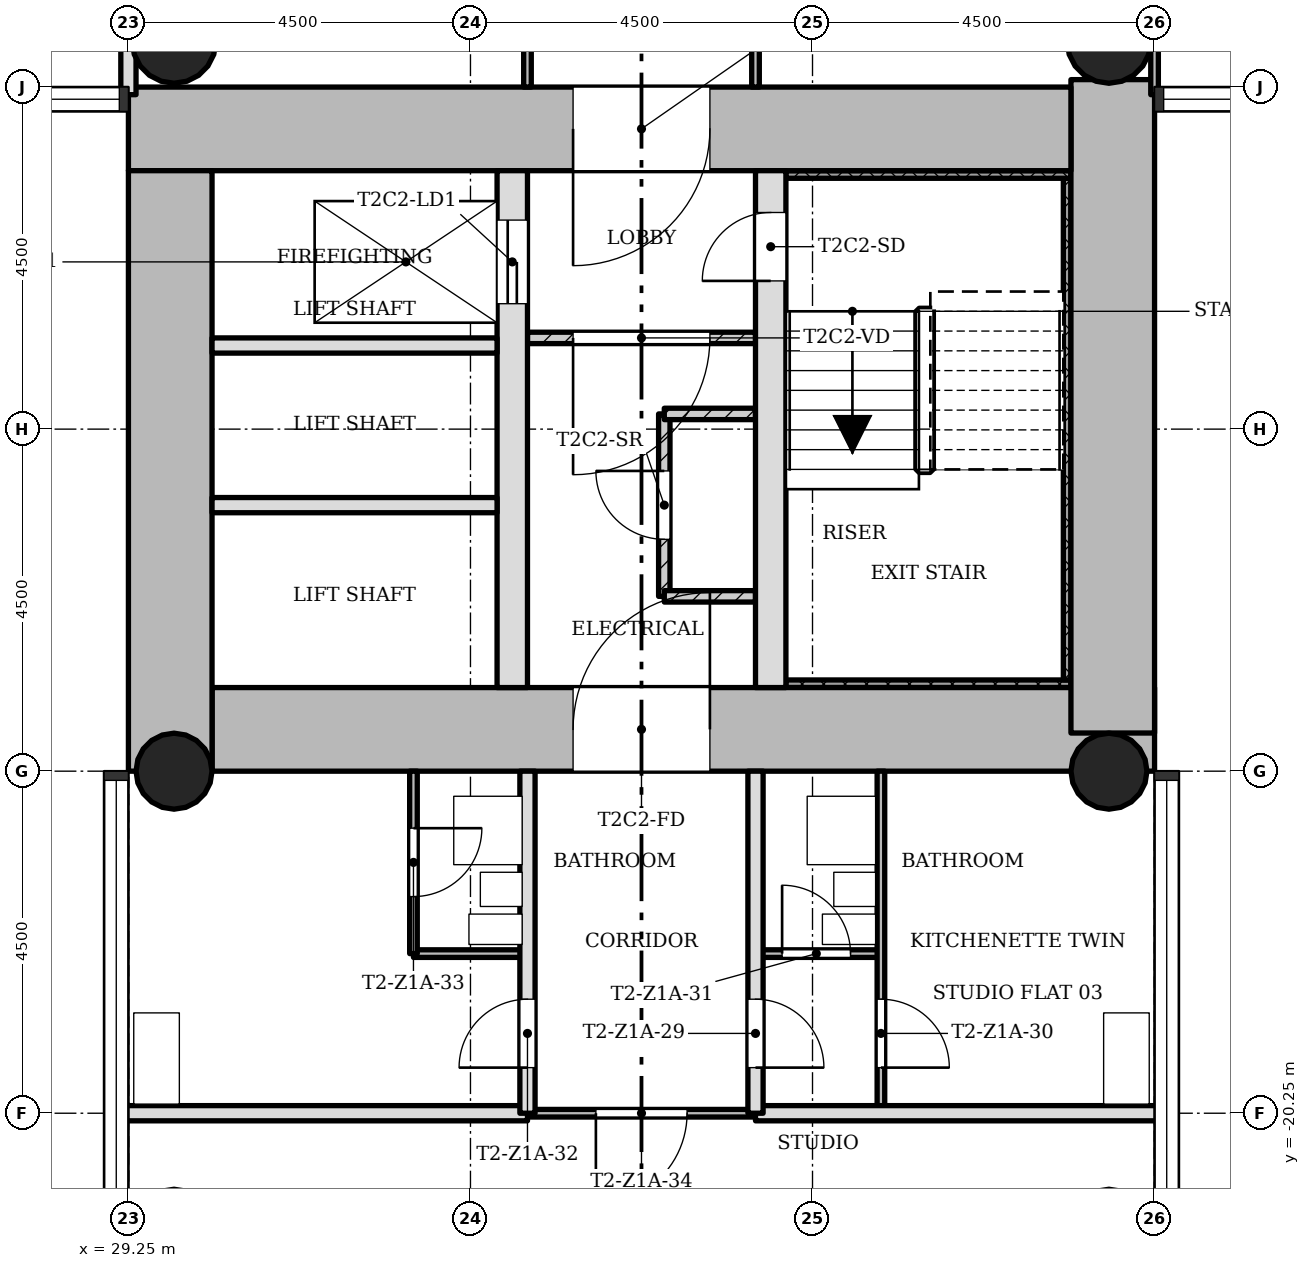
"""IFC4 building model, lengths in metres.
Left out: names, types, materials, properties, quantities, classifications, styles, units other than length and angle.
Written with IfcOpenShell. Run it as: python <this file> out.ifc"""

import sys

from ifc_helpers import new_model, si_unit, direction, frame, frame_2d, origin, origin_2d, place, context, subcontext, project, spatial, rectangle, hollow_circle, extrude, element, fill, save


model = new_model("IFC4")
c1 = context("Model", 3, precision=1e-05, world=origin(), true_north=direction((0.0, 1.0)))
c2 = subcontext(c1, "Body", "Model", "MODEL_VIEW")
j1 = project(units=[si_unit("LENGTHUNIT", "METRE"), si_unit("PLANEANGLEUNIT", "RADIAN")], contexts=[c1])
p1 = place(None, origin())
s1 = spatial("IfcSite", under=j1, at=p1, CompositionType="ELEMENT")
p2 = place(p1, origin())
s2 = spatial("IfcBuilding", under=s1, at=p2, CompositionType="ELEMENT")
p3 = place(p2, frame((0.0, 0.0, 27.9)))
s3 = spatial("IfcBuildingStorey", under=s2, at=p3, CompositionType="ELEMENT", Elevation=27.9)
p4 = place(p3, frame((30.35, -15.2, 0.0), z_axis=(0.0, 0.0, 1.0), x_axis=(1.0, 0.0, 0.0)))
e1 = element("IfcWall", 1, at=p4, inside=s3, PredefinedType="SHEAR", context=c2, shape_type="SweptSolid", body=[
    extrude(rectangle(XDim=12.4, YDim=1.1, at=frame_2d((6.2, 0.0))), origin(), (0.0, 0.0, 1.0), 3.4),
])
p5 = place(p4, frame((4.75, 0.0, 0.0)))
e2 = element("IfcOpeningElement", 2, at=p5, cuts=e1, PredefinedType="OPENING", context=c2, shape_type="SweptSolid", body=[
    extrude(rectangle(XDim=1.8, YDim=2.1, at=frame_2d((0.9, 1.05))), frame((0.0, 0.56, 0.0), z_axis=(0.0, -1.0, 0.0), x_axis=(1.0, 0.0, 0.0)), (0.0, 0.0, 1.0), 1.12),
])
p6 = place(p3, frame((42.2, -15.248, 0.0), z_axis=(0.0, 0.0, 1.0), x_axis=(0.0, 1.0, 0.0)))
e3 = element("IfcWall", 3, at=p6, inside=s3, PredefinedType="SHEAR", context=c2, shape_type="SweptSolid", body=[
    extrude(rectangle(XDim=8.596, YDim=1.1, at=frame_2d((4.298, 0.0))), origin(), (0.0, 0.0, 1.0), 3.4),
])
p7 = place(p3, frame((41.65, -7.3, 0.0), z_axis=(0.0, 0.0, 1.0), x_axis=(-1.0, 0.0, 0.0)))
e4 = element("IfcWall", 4, at=p7, inside=s3, PredefinedType="SHEAR", context=c2, shape_type="SweptSolid", body=[
    extrude(rectangle(XDim=12.4, YDim=1.1, at=frame_2d((6.2, 0.0))), origin(), (0.0, 0.0, 1.0), 3.4),
])
p8 = place(p7, frame((4.75, 0.0, 0.0)))
e5 = element("IfcOpeningElement", 5, at=p8, cuts=e4, PredefinedType="OPENING", context=c2, shape_type="SweptSolid", body=[
    extrude(rectangle(XDim=1.8, YDim=2.1, at=frame_2d((0.9, 1.05))), frame((0.0, 0.56, 0.0), z_axis=(0.0, -1.0, 0.0), x_axis=(1.0, 0.0, 0.0)), (0.0, 0.0, 1.0), 1.12),
])
p9 = place(p3, frame((29.8, -7.85, 0.0), z_axis=(0.0, 0.0, 1.0), x_axis=(0.0, -1.0, 0.0)))
e6 = element("IfcWall", 6, at=p9, inside=s3, PredefinedType="SHEAR", context=c2, shape_type="SweptSolid", body=[
    extrude(rectangle(XDim=7.9, YDim=1.1, at=frame_2d((3.95, 0.0))), origin(), (0.0, 0.0, 1.0), 3.4),
])
p10 = place(p3, frame((34.3, -14.65, 0.0), z_axis=(0.0, 0.0, 1.0), x_axis=(0.0, 1.0, 0.0)))
e7 = element("IfcWall", 7, at=p10, inside=s3, PredefinedType="SHEAR", context=c2, shape_type="SweptSolid", body=[
    extrude(rectangle(XDim=6.8, YDim=0.4, at=frame_2d((3.4, 0.0))), origin(), (0.0, 0.0, 1.0), 3.4),
])
p11 = place(p10, frame((5.05, 0.0, 0.0)))
e8 = element("IfcOpeningElement", 8, at=p11, cuts=e7, PredefinedType="OPENING", context=c2, shape_type="SweptSolid", body=[
    extrude(rectangle(XDim=1.1, YDim=2.1, at=frame_2d((0.55, 1.05))), frame((0.0, 0.21, 0.0), z_axis=(0.0, -1.0, 0.0), x_axis=(1.0, 0.0, 0.0)), (0.0, 0.0, 1.0), 0.42),
])
p12 = place(p3, frame((37.7, -14.65, 0.0), z_axis=(0.0, 0.0, 1.0), x_axis=(0.0, 1.0, 0.0)))
e9 = element("IfcWall", 9, at=p12, inside=s3, PredefinedType="SHEAR", context=c2, shape_type="SweptSolid", body=[
    extrude(rectangle(XDim=6.8, YDim=0.4, at=frame_2d((3.4, 0.0))), origin(), (0.0, 0.0, 1.0), 3.4),
])
p13 = place(p12, frame((5.35, 0.0, 0.0)))
e10 = element("IfcOpeningElement", 10, at=p13, cuts=e9, PredefinedType="OPENING", context=c2, shape_type="SweptSolid", body=[
    extrude(rectangle(XDim=0.9, YDim=2.1, at=frame_2d((0.45, 1.05))), frame((0.0, 0.21, 0.0), z_axis=(0.0, -1.0, 0.0), x_axis=(1.0, 0.0, 0.0)), (0.0, 0.0, 1.0), 0.42),
])
for number, where, z_axis, x_axis in (
    (11, (42.15, -15.75, 0.0), (0.0, 0.0, 1.0), (1.0, 0.0, 0.0)),
    (12, (29.85, -15.75, 0.0), (0.0, 0.0, 1.0), (1.0, 0.0, 0.0)),
):
    element("IfcColumn", number, at=place(p3, frame(where, z_axis=z_axis, x_axis=x_axis)), inside=s3, PredefinedType="COLUMN", context=c2, shape_type="SweptSolid", body=[
        extrude(hollow_circle(Radius=0.5, WallThickness=0.036, at=origin_2d()), origin(), (0.0, 0.0, 1.0), 3.4),
    ])
for number, where, z_axis, x_axis in (
    (13, (42.15, -6.15, 0.0), (0.0, 0.0, 1.0), (1.0, 0.0, 0.0)),
    (14, (29.85, -6.15, 0.0), (0.0, 0.0, 1.0), (1.0, 0.0, 0.0)),
):
    element("IfcColumn", number, at=place(p3, frame(where, z_axis=z_axis, x_axis=x_axis)), inside=s3, PredefinedType="COLUMN", context=c2, shape_type="SweptSolid", body=[
        extrude(hollow_circle(Radius=0.55, WallThickness=0.04, at=origin_2d()), origin(), (0.0, 0.0, 1.0), 3.4),
    ])
p14 = place(p3, frame((34.5, -10.05, 0.0), z_axis=(0.0, 0.0, 1.0), x_axis=(1.0, 0.0, 0.0)))
e15 = element("IfcWall", 15, at=p14, inside=s3, PredefinedType="PARTITIONING", context=c2, shape_type="SweptSolid", body=[
    extrude(rectangle(XDim=3.0, YDim=0.15, at=frame_2d((1.5, 0.0))), origin(), (0.0, 0.0, 1.0), 3.0),
])
p15 = place(p14, frame((0.6, 0.0, 0.0)))
e16 = element("IfcOpeningElement", 16, at=p15, cuts=e15, PredefinedType="OPENING", context=c2, shape_type="SweptSolid", body=[
    extrude(rectangle(XDim=1.8, YDim=2.1, at=frame_2d((0.9, 1.05))), frame((0.0, 0.085, 0.0), z_axis=(0.0, -1.0, 0.0), x_axis=(1.0, 0.0, 0.0)), (0.0, 0.0, 1.0), 0.17),
])
for number, where, z_axis, x_axis in (
    (17, (30.35, -10.15, 0.0), (0.0, 0.0, 1.0), (1.0, 0.0, 0.0)),
    (18, (30.35, -12.25, 0.0), (0.0, 0.0, 1.0), (1.0, 0.0, 0.0)),
):
    element("IfcWall", number, at=place(p3, frame(where, z_axis=z_axis, x_axis=x_axis)), inside=s3, PredefinedType="SOLIDWALL", context=c2, shape_type="SweptSolid", body=[
        extrude(rectangle(XDim=3.75, YDim=0.2, at=frame_2d((1.875, 0.0))), origin(), (0.0, 0.0, 1.0), 3.0),
    ])
p16 = place(p3, frame((36.3, -11.05, 0.0), z_axis=(0.0, 0.0, 1.0), x_axis=(0.0, -1.0, 0.0)))
e19 = element("IfcWall", 19, at=p16, inside=s3, PredefinedType="PARTITIONING", context=c2, shape_type="SweptSolid", body=[
    extrude(rectangle(XDim=2.4, YDim=0.15, at=frame_2d((1.2, 0.0))), origin(), (0.0, 0.0, 1.0), 3.0),
])
p17 = place(p16, frame((0.75, 0.0, 0.0)))
e20 = element("IfcOpeningElement", 20, at=p17, cuts=e19, PredefinedType="OPENING", context=c2, shape_type="SweptSolid", body=[
    extrude(rectangle(XDim=0.9, YDim=2.1, at=frame_2d((0.45, 1.05))), frame((0.0, 0.085, 0.0), z_axis=(0.0, -1.0, 0.0), x_axis=(1.0, 0.0, 0.0)), (0.0, 0.0, 1.0), 0.17),
])
for number, where, z_axis, x_axis in (
    (21, (36.3, -11.05, 0.0), (0.0, 0.0, 1.0), (1.0, 0.0, 0.0)),
    (22, (36.3, -13.45, 0.0), (0.0, 0.0, 1.0), (1.0, 0.0, 0.0)),
):
    element("IfcWall", number, at=place(p3, frame(where, z_axis=z_axis, x_axis=x_axis)), inside=s3, PredefinedType="PARTITIONING", context=c2, shape_type="SweptSolid", body=[
        extrude(rectangle(XDim=1.2, YDim=0.15, at=frame_2d((0.6, 0.0))), origin(), (0.0, 0.0, 1.0), 3.0),
    ])
p18 = place(p3, frame((37.5, -20.25, 0.0), z_axis=(0.0, 0.0, 1.0), x_axis=(-1.0, 0.0, 0.0)))
e23 = element("IfcWall", 23, at=p18, inside=s3, PredefinedType="PARTITIONING", context=c2, shape_type="SweptSolid", body=[
    extrude(rectangle(XDim=3.0, YDim=0.1, at=frame_2d((1.5, 0.0))), origin(), (0.0, 0.0, 1.0), 3.0),
])
p19 = place(p18, frame((0.9, 0.0, 0.0)))
e24 = element("IfcOpeningElement", 24, at=p19, cuts=e23, PredefinedType="OPENING", context=c2, shape_type="SweptSolid", body=[
    extrude(rectangle(XDim=1.2, YDim=2.1, at=frame_2d((0.6, 1.05))), frame((0.0, 0.06, 0.0), z_axis=(0.0, -1.0, 0.0), x_axis=(1.0, 0.0, 0.0)), (0.0, 0.0, 1.0), 0.12),
])
for number, where, z_axis, x_axis in (
    (25, (42.85, -20.25, 0.0), (0.0, 0.0, 1.0), (-1.0, 0.0, 0.0)),
    (26, (34.5, -20.25, 0.0), (0.0, 0.0, 1.0), (-1.0, 0.0, 0.0)),
):
    element("IfcWall", number, at=place(p3, frame(where, z_axis=z_axis, x_axis=x_axis)), inside=s3, PredefinedType="SOLIDWALL", context=c2, shape_type="SweptSolid", body=[
        extrude(rectangle(XDim=5.35, YDim=0.2, at=frame_2d((2.675, 0.0))), origin(), (0.0, 0.0, 1.0), 3.0),
    ])
p20 = place(p3, frame((39.15, -18.15, 0.0), z_axis=(0.0, 0.0, 1.0), x_axis=(-1.0, 0.0, 0.0)))
e27 = element("IfcWall", 27, at=p20, inside=s3, PredefinedType="PARTITIONING", context=c2, shape_type="SweptSolid", body=[
    extrude(rectangle(XDim=1.65, YDim=0.1, at=frame_2d((0.825, 0.0))), origin(), (0.0, 0.0, 1.0), 3.0),
])
p21 = place(p20, frame((0.4, 0.0, 0.0)))
e28 = element("IfcOpeningElement", 28, at=p21, cuts=e27, PredefinedType="OPENING", context=c2, shape_type="SweptSolid", body=[
    extrude(rectangle(XDim=0.9, YDim=2.1, at=frame_2d((0.45, 1.05))), frame((0.0, 0.06, 0.0), z_axis=(0.0, -1.0, 0.0), x_axis=(1.0, 0.0, 0.0)), (0.0, 0.0, 1.0), 0.12),
])
p22 = place(p3, frame((34.5, -18.15, 0.0), z_axis=(0.0, 0.0, 1.0), x_axis=(-1.0, 0.0, 0.0)))
e29 = element("IfcWall", 29, at=p22, inside=s3, PredefinedType="PARTITIONING", context=c2, shape_type="SweptSolid", body=[
    extrude(rectangle(XDim=1.5, YDim=0.1, at=frame_2d((0.75, 0.0))), origin(), (0.0, 0.0, 1.0), 3.0),
])
p23 = place(p3, frame((42.75, -6.85, 0.0), z_axis=(0.0, 0.0, 1.0), x_axis=(0.0, 1.0, 0.0)))
e30 = element("IfcWall", 30, at=p23, inside=s3, PredefinedType="PARTITIONING", context=c2, shape_type="SweptSolid", body=[
    extrude(rectangle(XDim=5.95, YDim=0.1, at=frame_2d((2.975, 0.0))), origin(), (0.0, 0.0, 1.0), 3.0),
])
p24 = place(p3, frame((39.15, -20.25, 0.0), z_axis=(0.0, 0.0, 1.0), x_axis=(0.0, 1.0, 0.0)))
e31 = element("IfcWall", 31, at=p24, inside=s3, PredefinedType="PARTITIONING", context=c2, shape_type="SweptSolid", body=[
    extrude(rectangle(XDim=4.5, YDim=0.1, at=frame_2d((2.25, 0.0))), origin(), (0.0, 0.0, 1.0), 3.0),
])
p25 = place(p24, frame((0.6, 0.0, 0.0)))
e32 = element("IfcOpeningElement", 32, at=p25, cuts=e31, PredefinedType="OPENING", context=c2, shape_type="SweptSolid", body=[
    extrude(rectangle(XDim=0.9, YDim=2.1, at=frame_2d((0.45, 1.05))), frame((0.0, 0.06, 0.0), z_axis=(0.0, -1.0, 0.0), x_axis=(1.0, 0.0, 0.0)), (0.0, 0.0, 1.0), 0.12),
])
p26 = place(p3, frame((37.5, -6.75, 0.0), z_axis=(0.0, 0.0, 1.0), x_axis=(0.0, 1.0, 0.0)))
e33 = element("IfcWall", 33, at=p26, inside=s3, PredefinedType="PARTITIONING", context=c2, shape_type="SweptSolid", body=[
    extrude(rectangle(XDim=5.85, YDim=0.1, at=frame_2d((2.925, 0.0))), origin(), (0.0, 0.0, 1.0), 3.0),
])
p27 = place(p26, frame((1.575, 0.0, 0.0)))
e34 = element("IfcOpeningElement", 34, at=p27, cuts=e33, PredefinedType="OPENING", context=c2, shape_type="SweptSolid", body=[
    extrude(rectangle(XDim=0.9, YDim=2.1, at=frame_2d((0.45, 1.05))), frame((0.0, 0.06, 0.0), z_axis=(0.0, -1.0, 0.0), x_axis=(1.0, 0.0, 0.0)), (0.0, 0.0, 1.0), 0.12),
])
p28 = place(p3, frame((37.5, -20.25, 0.0), z_axis=(0.0, 0.0, 1.0), x_axis=(0.0, 1.0, 0.0)))
e35 = element("IfcWall", 35, at=p28, inside=s3, PredefinedType="SOLIDWALL", context=c2, shape_type="SweptSolid", body=[
    extrude(rectangle(XDim=4.5, YDim=0.2, at=frame_2d((2.25, 0.0))), origin(), (0.0, 0.0, 1.0), 3.0),
])
p29 = place(p28, frame((0.6, 0.0, 0.0)))
e36 = element("IfcOpeningElement", 36, at=p29, cuts=e35, PredefinedType="OPENING", context=c2, shape_type="SweptSolid", body=[
    extrude(rectangle(XDim=0.9, YDim=2.1, at=frame_2d((0.45, 1.05))), frame((0.0, 0.11, 0.0), z_axis=(0.0, -1.0, 0.0), x_axis=(1.0, 0.0, 0.0)), (0.0, 0.0, 1.0), 0.22),
])
p30 = place(p3, frame((34.5, -6.75, 0.0), z_axis=(0.0, 0.0, 1.0), x_axis=(0.0, 1.0, 0.0)))
e37 = element("IfcWall", 37, at=p30, inside=s3, PredefinedType="PARTITIONING", context=c2, shape_type="SweptSolid", body=[
    extrude(rectangle(XDim=5.85, YDim=0.1, at=frame_2d((2.925, 0.0))), origin(), (0.0, 0.0, 1.0), 3.0),
])
p31 = place(p30, frame((2.475, 0.0, 0.0)))
e38 = element("IfcOpeningElement", 38, at=p31, cuts=e37, PredefinedType="OPENING", context=c2, shape_type="SweptSolid", body=[
    extrude(rectangle(XDim=0.9, YDim=2.1, at=frame_2d((0.45, 1.05))), frame((0.0, 0.06, 0.0), z_axis=(0.0, -1.0, 0.0), x_axis=(1.0, 0.0, 0.0)), (0.0, 0.0, 1.0), 0.12),
])
p32 = place(p3, frame((34.5, -20.25, 0.0), z_axis=(0.0, 0.0, 1.0), x_axis=(0.0, 1.0, 0.0)))
e39 = element("IfcWall", 39, at=p32, inside=s3, PredefinedType="SOLIDWALL", context=c2, shape_type="SweptSolid", body=[
    extrude(rectangle(XDim=4.5, YDim=0.2, at=frame_2d((2.25, 0.0))), origin(), (0.0, 0.0, 1.0), 3.0),
])
p33 = place(p32, frame((0.6, 0.0, 0.0)))
e40 = element("IfcOpeningElement", 40, at=p33, cuts=e39, PredefinedType="OPENING", context=c2, shape_type="SweptSolid", body=[
    extrude(rectangle(XDim=0.9, YDim=2.1, at=frame_2d((0.45, 1.05))), frame((0.0, 0.11, 0.0), z_axis=(0.0, -1.0, 0.0), x_axis=(1.0, 0.0, 0.0)), (0.0, 0.0, 1.0), 0.22),
])
p34 = place(p3, frame((33.0, -18.15, 0.0), z_axis=(0.0, 0.0, 1.0), x_axis=(0.0, 1.0, 0.0)))
e41 = element("IfcWall", 41, at=p34, inside=s3, PredefinedType="PARTITIONING", context=c2, shape_type="SweptSolid", body=[
    extrude(rectangle(XDim=2.4, YDim=0.1, at=frame_2d((1.2, 0.0))), origin(), (0.0, 0.0, 1.0), 3.0),
])
p35 = place(p34, frame((0.75, 0.0, 0.0)))
e42 = element("IfcOpeningElement", 42, at=p35, cuts=e41, PredefinedType="OPENING", context=c2, shape_type="SweptSolid", body=[
    extrude(rectangle(XDim=0.9, YDim=2.1, at=frame_2d((0.45, 1.05))), frame((0.0, 0.06, 0.0), z_axis=(0.0, -1.0, 0.0), x_axis=(1.0, 0.0, 0.0)), (0.0, 0.0, 1.0), 0.12),
])
p36 = place(p3, frame((29.25, -6.85, 0.0), z_axis=(0.0, 0.0, 1.0), x_axis=(0.0, 1.0, 0.0)))
e43 = element("IfcWall", 43, at=p36, inside=s3, PredefinedType="SOLIDWALL", context=c2, shape_type="SweptSolid", body=[
    extrude(rectangle(XDim=13.7, YDim=0.2, at=frame_2d((6.85, 0.0))), origin(), (0.0, 0.0, 1.0), 3.0),
])
p37 = place(p36, frame((6.4, 0.0, 0.0)))
e44 = element("IfcOpeningElement", 44, at=p37, cuts=e43, PredefinedType="OPENING", context=c2, shape_type="SweptSolid", body=[
    extrude(rectangle(XDim=0.9, YDim=2.1, at=frame_2d((0.45, 1.05))), frame((0.0, 0.11, 0.0), z_axis=(0.0, -1.0, 0.0), x_axis=(1.0, 0.0, 0.0)), (0.0, 0.0, 1.0), 0.22),
])
p38 = place(p3, frame((37.9, -14.6, 0.0), z_axis=(0.0, 0.0, 1.0), x_axis=(1.0, 0.0, 0.0)))
e45 = element("IfcWall", 45, at=p38, inside=s3, PredefinedType="SHEAR", context=c2, shape_type="SweptSolid", body=[
    extrude(rectangle(XDim=3.75, YDim=0.1, at=frame_2d((1.875, 0.0))), origin(), (0.0, 0.0, 1.0), 3.4),
])
p39 = place(p3, frame((41.6, -7.95, 0.0), z_axis=(0.0, 0.0, 1.0), x_axis=(0.0, -1.0, 0.0)))
e46 = element("IfcWall", 46, at=p39, inside=s3, PredefinedType="SHEAR", context=c2, shape_type="SweptSolid", body=[
    extrude(rectangle(XDim=6.6, YDim=0.1, at=frame_2d((3.3, 0.0))), origin(), (0.0, 0.0, 1.0), 3.4),
])
p40 = place(p3, frame((37.9, -7.9, 0.0), z_axis=(0.0, 0.0, 1.0), x_axis=(1.0, 0.0, 0.0)))
e47 = element("IfcWall", 47, at=p40, inside=s3, PredefinedType="SHEAR", context=c2, shape_type="SweptSolid", body=[
    extrude(rectangle(XDim=3.75, YDim=0.1, at=frame_2d((1.875, 0.0))), origin(), (0.0, 0.0, 1.0), 3.4),
])
p41 = place(p15, origin())
e48 = element("IfcDoor", 48, at=p41, inside=s3, OperationType="SINGLE_SWING_LEFT", PredefinedType="DOOR", context=c2, shape_type="SweptSolid", body=[
    extrude(rectangle(XDim=1.8, YDim=2.1, at=frame_2d((0.9, 1.05))), frame((0.0, 0.025, 0.0), z_axis=(0.0, -1.0, 0.0), x_axis=(1.0, 0.0, 0.0)), (0.0, 0.0, 1.0), 0.05),
])
fill(e16, e48)
p42 = place(p17, origin())
e49 = element("IfcDoor", 49, at=p42, inside=s3, OperationType="SINGLE_SWING_LEFT", PredefinedType="DOOR", context=c2, shape_type="SweptSolid", body=[
    extrude(rectangle(XDim=0.9, YDim=2.1, at=frame_2d((0.45, 1.05))), frame((0.0, 0.025, 0.0), z_axis=(0.0, -1.0, 0.0), x_axis=(1.0, 0.0, 0.0)), (0.0, 0.0, 1.0), 0.05),
])
fill(e20, e49)
p43 = place(p29, origin())
e50 = element("IfcDoor", 50, at=p43, inside=s3, OperationType="SINGLE_SWING_LEFT", PredefinedType="DOOR", context=c2, shape_type="SweptSolid", body=[
    extrude(rectangle(XDim=0.9, YDim=2.1, at=frame_2d((0.45, 1.05))), frame((0.0, 0.025, 0.0), z_axis=(0.0, -1.0, 0.0), x_axis=(1.0, 0.0, 0.0)), (0.0, 0.0, 1.0), 0.05),
])
fill(e36, e50)
p44 = place(p25, origin())
e51 = element("IfcDoor", 51, at=p44, inside=s3, OperationType="SINGLE_SWING_LEFT", PredefinedType="DOOR", context=c2, shape_type="SweptSolid", body=[
    extrude(rectangle(XDim=0.9, YDim=2.1, at=frame_2d((0.45, 1.05))), frame((0.0, 0.025, 0.0), z_axis=(0.0, -1.0, 0.0), x_axis=(1.0, 0.0, 0.0)), (0.0, 0.0, 1.0), 0.05),
])
fill(e32, e51)
p45 = place(p21, origin())
e52 = element("IfcDoor", 52, at=p45, inside=s3, OperationType="SINGLE_SWING_RIGHT", PredefinedType="DOOR", context=c2, shape_type="SweptSolid", body=[
    extrude(rectangle(XDim=0.9, YDim=2.1, at=frame_2d((0.45, 1.05))), frame((0.0, 0.025, 0.0), z_axis=(0.0, -1.0, 0.0), x_axis=(1.0, 0.0, 0.0)), (0.0, 0.0, 1.0), 0.05),
])
fill(e28, e52)
p46 = place(p33, origin())
e53 = element("IfcDoor", 53, at=p46, inside=s3, OperationType="SINGLE_SWING_RIGHT", PredefinedType="DOOR", context=c2, shape_type="SweptSolid", body=[
    extrude(rectangle(XDim=0.9, YDim=2.1, at=frame_2d((0.45, 1.05))), frame((0.0, 0.025, 0.0), z_axis=(0.0, -1.0, 0.0), x_axis=(1.0, 0.0, 0.0)), (0.0, 0.0, 1.0), 0.05),
])
fill(e40, e53)
p47 = place(p35, origin())
e54 = element("IfcDoor", 54, at=p47, inside=s3, OperationType="SINGLE_SWING_RIGHT", PredefinedType="DOOR", context=c2, shape_type="SweptSolid", body=[
    extrude(rectangle(XDim=0.9, YDim=2.1, at=frame_2d((0.45, 1.05))), frame((0.0, 0.025, 0.0), z_axis=(0.0, -1.0, 0.0), x_axis=(1.0, 0.0, 0.0)), (0.0, 0.0, 1.0), 0.05),
])
fill(e42, e54)
p48 = place(p19, origin())
e55 = element("IfcDoor", 55, at=p48, inside=s3, OperationType="SINGLE_SWING_LEFT", PredefinedType="DOOR", context=c2, shape_type="SweptSolid", body=[
    extrude(rectangle(XDim=1.2, YDim=2.1, at=frame_2d((0.6, 1.05))), frame((0.0, 0.025, 0.0), z_axis=(0.0, -1.0, 0.0), x_axis=(1.0, 0.0, 0.0)), (0.0, 0.0, 1.0), 0.05),
])
fill(e24, e55)
p49 = place(p13, origin())
e56 = element("IfcDoor", 56, at=p49, inside=s3, OperationType="SINGLE_SWING_RIGHT", PredefinedType="DOOR", context=c2, shape_type="SweptSolid", body=[
    extrude(rectangle(XDim=0.9, YDim=2.1, at=frame_2d((0.45, 1.05))), frame((0.0, 0.025, 0.0), z_axis=(0.0, -1.0, 0.0), x_axis=(1.0, 0.0, 0.0)), (0.0, 0.0, 1.0), 0.05),
])
fill(e10, e56)
p50 = place(p11, origin())
e57 = element("IfcDoor", 57, at=p50, inside=s3, OperationType="SLIDING_TO_LEFT", PredefinedType="DOOR", context=c2, shape_type="SweptSolid", body=[
    extrude(rectangle(XDim=1.1, YDim=2.1, at=frame_2d((0.55, 1.05))), frame((0.0, 0.025, 0.0), z_axis=(0.0, -1.0, 0.0), x_axis=(1.0, 0.0, 0.0)), (0.0, 0.0, 1.0), 0.05),
])
fill(e8, e57)
p51 = place(p8, origin())
e58 = element("IfcDoor", 58, at=p51, inside=s3, OperationType="SINGLE_SWING_LEFT", PredefinedType="DOOR", context=c2, shape_type="SweptSolid", body=[
    extrude(rectangle(XDim=1.8, YDim=2.1, at=frame_2d((0.9, 1.05))), frame((0.0, 0.025, 0.0), z_axis=(0.0, -1.0, 0.0), x_axis=(1.0, 0.0, 0.0)), (0.0, 0.0, 1.0), 0.05),
])
fill(e5, e58)
p52 = place(p5, origin())
e59 = element("IfcDoor", 59, at=p52, inside=s3, OperationType="SINGLE_SWING_LEFT", PredefinedType="DOOR", context=c2, shape_type="SweptSolid", body=[
    extrude(rectangle(XDim=1.8, YDim=2.1, at=frame_2d((0.9, 1.05))), frame((0.0, 0.025, 0.0), z_axis=(0.0, -1.0, 0.0), x_axis=(1.0, 0.0, 0.0)), (0.0, 0.0, 1.0), 0.05),
])
fill(e2, e59)
save(model, sys.argv[1])
